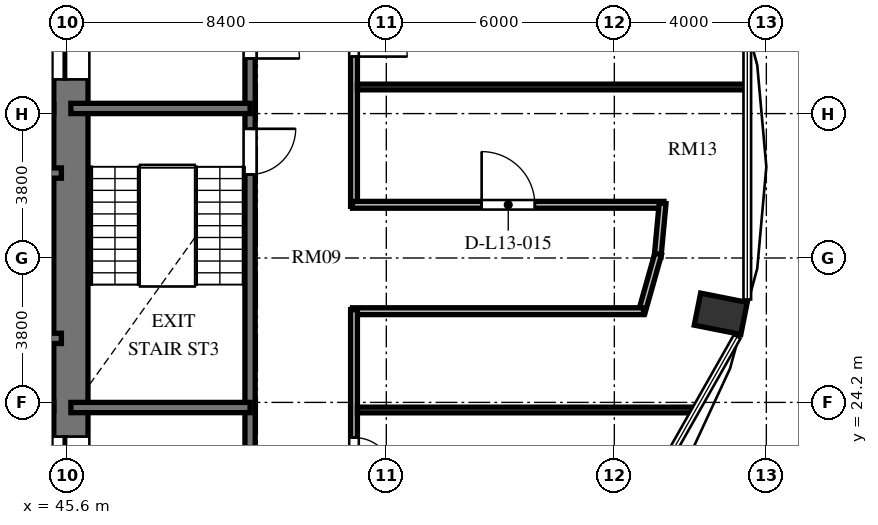
"""IFC4 building model, lengths in metres.
Left out: names, types, materials, properties, quantities, classifications, styles, units other than length and angle.
Written with IfcOpenShell. Run it as: python <this file> out.ifc"""

import sys

from ifc_helpers import new_model, si_unit, direction, frame, frame_2d, origin, origin_2d, place, context, subcontext, project, spatial, rectangle, extrude, element, fill, save


model = new_model("IFC4")
c1 = context("Model", 3, precision=1e-05, world=origin(), true_north=direction((0.0, 1.0)))
c2 = subcontext(c1, "Body", "Model", "MODEL_VIEW")
j1 = project(units=[si_unit("LENGTHUNIT", "METRE"), si_unit("PLANEANGLEUNIT", "RADIAN")], contexts=[c1])
p1 = place(None, origin())
s1 = spatial("IfcSite", under=j1, at=p1, CompositionType="ELEMENT")
p2 = place(p1, origin())
s2 = spatial("IfcBuilding", under=s1, at=p2, CompositionType="ELEMENT")
p3 = place(p2, frame((0.0, 0.0, 54.384)))
s3 = spatial("IfcBuildingStorey", under=s2, at=p3, CompositionType="ELEMENT", Elevation=54.384)
p4 = place(p3, frame((62.8, 26.532, 0.0), z_axis=(0.0, 0.0, 1.0), x_axis=(0.980785280403, -0.195090322016, 0.0)))
e1 = element("IfcColumn", 1, at=p4, inside=s3, PredefinedType="COLUMN", context=c2, shape_type="SweptSolid", body=[
    extrude(rectangle(XDim=1.25, YDim=0.86, at=origin_2d()), origin(), (0.0, 0.0, 1.0), 3.648),
])
p5 = place(p3, frame((45.7, 20.95, 0.0), z_axis=(0.0, 0.0, 1.0), x_axis=(0.0, 1.0, 0.0)))
e2 = element("IfcWall", 2, at=p5, inside=s3, PredefinedType="SHEAR", context=c2, shape_type="SweptSolid", body=[
    extrude(rectangle(XDim=14.1, YDim=0.9, at=frame_2d((7.05, 0.0))), origin(), (0.0, 0.0, 1.0), 3.648),
])
p6 = place(p5, frame((11.75, 0.0, 0.0)))
e3 = element("IfcOpeningElement", 3, at=p6, cuts=e2, PredefinedType="OPENING", context=c2, shape_type="SweptSolid", body=[
    extrude(rectangle(XDim=1.4, YDim=2.3, at=frame_2d((0.7, 1.15))), frame((0.0, 0.46, 0.0), z_axis=(0.0, -1.0, 0.0), x_axis=(1.0, 0.0, 0.0)), (0.0, 0.0, 1.0), 0.92),
])
p7 = place(p5, frame((0.95, 0.0, 0.0)))
e4 = element("IfcOpeningElement", 4, at=p7, cuts=e2, PredefinedType="OPENING", context=c2, shape_type="SweptSolid", body=[
    extrude(rectangle(XDim=1.4, YDim=2.3, at=frame_2d((0.7, 1.15))), frame((0.0, 0.46, 0.0), z_axis=(0.0, -1.0, 0.0), x_axis=(1.0, 0.0, 0.0)), (0.0, 0.0, 1.0), 0.92),
])
p8 = place(p3, frame((37.465, 30.235, 0.0), z_axis=(0.0, 0.0, 1.0), x_axis=(1.0, 0.0, 0.0)))
e5 = element("IfcWall", 5, at=p8, inside=s3, PredefinedType="SHEAR", context=c2, shape_type="SweptSolid", body=[
    extrude(rectangle(XDim=7.985, YDim=0.27, at=frame_2d((3.992, 0.0))), origin(), (0.0, 0.0, 1.0), 3.648),
])
p9 = place(p8, frame((6.455, 0.0, 0.0)))
e6 = element("IfcOpeningElement", 6, at=p9, cuts=e5, PredefinedType="OPENING", context=c2, shape_type="SweptSolid", body=[
    extrude(rectangle(XDim=1.2, YDim=2.15, at=frame_2d((0.6, 1.075))), frame((0.0, 0.145, 0.0), z_axis=(0.0, -1.0, 0.0), x_axis=(1.0, 0.0, 0.0)), (0.0, 0.0, 1.0), 0.29),
])
p10 = place(p3, frame((37.465, 25.885, 0.0), z_axis=(0.0, 0.0, 1.0), x_axis=(1.0, 0.0, 0.0)))
e7 = element("IfcWall", 7, at=p10, inside=s3, PredefinedType="SHEAR", context=c2, shape_type="SweptSolid", body=[
    extrude(rectangle(XDim=7.985, YDim=0.27, at=frame_2d((3.992, 0.0))), origin(), (0.0, 0.0, 1.0), 3.648),
])
for number, where, z_axis, x_axis in (
    (8, (42.95, 31.92, 0.0), (0.0, 0.0, 1.0), (1.0, 0.0, 0.0)),
    (9, (42.95, 24.1, 0.0), (0.0, 0.0, 1.0), (1.0, 0.0, 0.0)),
):
    element("IfcWall", number, at=place(p3, frame(where, z_axis=z_axis, x_axis=x_axis)), inside=s3, PredefinedType="SOLIDWALL", context=c2, shape_type="SweptSolid", body=[
        extrude(rectangle(XDim=2.3, YDim=0.25, at=frame_2d((1.15, 0.0))), origin(), (0.0, 0.0, 1.0), 3.428),
    ])
p11 = place(p3, frame((50.415, 35.845, 0.0), z_axis=(0.0, 0.0, 1.0), x_axis=(0.0, -1.0, 0.0)))
e10 = element("IfcWall", 10, at=p11, inside=s3, PredefinedType="SHEAR", context=c2, shape_type="SweptSolid", body=[
    extrude(rectangle(XDim=15.825, YDim=0.27, at=frame_2d((7.913, 0.0))), origin(), (0.0, 0.0, 1.0), 3.648),
])
p12 = place(p11, frame((4.445, 0.0, 0.0)))
e11 = element("IfcOpeningElement", 11, at=p12, cuts=e10, PredefinedType="OPENING", context=c2, shape_type="SweptSolid", body=[
    extrude(rectangle(XDim=1.2, YDim=2.15, at=frame_2d((0.6, 1.075))), frame((0.0, 0.145, 0.0), z_axis=(0.0, -1.0, 0.0), x_axis=(1.0, 0.0, 0.0)), (0.0, 0.0, 1.0), 0.29),
])
p13 = place(p11, frame((1.295, 0.0, 0.0)))
e12 = element("IfcOpeningElement", 12, at=p13, cuts=e10, PredefinedType="OPENING", context=c2, shape_type="SweptSolid", body=[
    extrude(rectangle(XDim=1.3, YDim=2.2, at=frame_2d((0.65, 1.1))), frame((0.0, 0.145, 0.0), z_axis=(0.0, -1.0, 0.0), x_axis=(1.0, 0.0, 0.0)), (0.0, 0.0, 1.0), 0.29),
])
p14 = place(p11, frame((13.095, 0.0, 0.0)))
e13 = element("IfcOpeningElement", 13, at=p14, cuts=e10, PredefinedType="OPENING", context=c2, shape_type="SweptSolid", body=[
    extrude(rectangle(XDim=1.3, YDim=2.2, at=frame_2d((0.65, 1.1))), frame((0.0, 0.145, 0.0), z_axis=(0.0, -1.0, 0.0), x_axis=(1.0, 0.0, 0.0)), (0.0, 0.0, 1.0), 0.29),
])
for number, where, z_axis, x_axis in (
    (14, (45.7, 31.935, 0.0), (0.0, 0.0, 1.0), (1.0, 0.0, 0.0)),
    (15, (45.7, 24.065, 0.0), (0.0, 0.0, 1.0), (1.0, 0.0, 0.0)),
):
    element("IfcWall", number, at=place(p3, frame(where, z_axis=z_axis, x_axis=x_axis)), inside=s3, PredefinedType="SHEAR", context=c2, shape_type="SweptSolid", body=[
        extrude(rectangle(XDim=4.715, YDim=0.27, at=frame_2d((2.357, 0.0))), origin(), (0.0, 0.0, 1.0), 3.648),
    ])
p15 = place(p3, frame((53.15, 38.79, 0.0), z_axis=(0.0, 0.0, 1.0), x_axis=(0.0, -1.0, 0.0)))
e16 = element("IfcWall", 16, at=p15, inside=s3, PredefinedType="PARTITIONING", context=c2, shape_type="SweptSolid", body=[
    extrude(rectangle(XDim=9.43, YDim=0.18, at=frame_2d((4.715, 0.0))), origin(), (0.0, 0.0, 1.0), 3.428),
])
p16 = place(p15, frame((4.09, 0.0, 0.0)))
e17 = element("IfcOpeningElement", 17, at=p16, cuts=e16, PredefinedType="OPENING", context=c2, shape_type="SweptSolid", body=[
    extrude(rectangle(XDim=1.4, YDim=2.2, at=frame_2d((0.7, 1.1))), frame((0.0, 0.1, 0.0), z_axis=(0.0, -1.0, 0.0), x_axis=(1.0, 0.0, 0.0)), (0.0, 0.0, 1.0), 0.2),
])
p17 = place(p3, frame((53.11, 29.4, 0.0), z_axis=(0.0, 0.0, 1.0), x_axis=(1.0, 0.0, 0.0)))
e18 = element("IfcWall", 18, at=p17, inside=s3, PredefinedType="PARTITIONING", context=c2, shape_type="SweptSolid", body=[
    extrude(rectangle(XDim=8.197, YDim=0.18, at=frame_2d((4.098, 0.0))), origin(), (0.0, 0.0, 1.0), 3.428),
])
p18 = place(p17, frame((3.398, 0.0, 0.0)))
e19 = element("IfcOpeningElement", 19, at=p18, cuts=e18, PredefinedType="OPENING", context=c2, shape_type="SweptSolid", body=[
    extrude(rectangle(XDim=1.4, YDim=2.2, at=frame_2d((0.7, 1.1))), frame((0.0, 0.1, 0.0), z_axis=(0.0, -1.0, 0.0), x_axis=(1.0, 0.0, 0.0)), (0.0, 0.0, 1.0), 0.2),
])
p19 = place(p3, frame((61.271, 29.44, 0.0), z_axis=(0.0, 0.0, 1.0), x_axis=(-0.092539930621, -0.995708974169, 0.0)))
e20 = element("IfcWall", 20, at=p19, inside=s3, PredefinedType="PARTITIONING", context=c2, shape_type="SweptSolid", body=[
    extrude(rectangle(XDim=1.417, YDim=0.18, at=frame_2d((0.708, 0.0))), origin(), (0.0, 0.0, 1.0), 3.428),
])
p20 = place(p3, frame((61.154, 28.107, 0.0), z_axis=(0.0, 0.0, 1.0), x_axis=(-0.271748942561, -0.962368179138, 0.0)))
e21 = element("IfcWall", 21, at=p20, inside=s3, PredefinedType="PARTITIONING", context=c2, shape_type="SweptSolid", body=[
    extrude(rectangle(XDim=1.606, YDim=0.18, at=frame_2d((0.803, 0.0))), origin(), (0.0, 0.0, 1.0), 3.428),
])
p21 = place(p3, frame((60.768, 26.6, 0.0), z_axis=(0.0, 0.0, 1.0), x_axis=(-1.0, 0.0, 0.0)))
e22 = element("IfcWall", 22, at=p21, inside=s3, PredefinedType="PARTITIONING", context=c2, shape_type="SweptSolid", body=[
    extrude(rectangle(XDim=7.658, YDim=0.18, at=frame_2d((3.829, 0.0))), origin(), (0.0, 0.0, 1.0), 3.428),
])
p22 = place(p3, frame((53.15, 26.64, 0.0), z_axis=(0.0, 0.0, 1.0), x_axis=(0.0, -1.0, 0.0)))
e23 = element("IfcWall", 23, at=p22, inside=s3, PredefinedType="PARTITIONING", context=c2, shape_type="SweptSolid", body=[
    extrude(rectangle(XDim=6.66, YDim=0.18, at=frame_2d((3.33, 0.0))), origin(), (0.0, 0.0, 1.0), 3.428),
])
p23 = place(p22, frame((3.365, 0.0, 0.0)))
e24 = element("IfcOpeningElement", 24, at=p23, cuts=e23, PredefinedType="OPENING", context=c2, shape_type="SweptSolid", body=[
    extrude(rectangle(XDim=1.05, YDim=2.15, at=frame_2d((0.525, 1.075))), frame((0.0, 0.1, 0.0), z_axis=(0.0, -1.0, 0.0), x_axis=(1.0, 0.0, 0.0)), (0.0, 0.0, 1.0), 0.2),
])
p24 = place(p3, frame((53.24, 24.0, 0.0), z_axis=(0.0, 0.0, 1.0), x_axis=(1.0, 0.0, 0.0)))
e25 = element("IfcWall", 25, at=p24, inside=s3, PredefinedType="PARTITIONING", context=c2, shape_type="SweptSolid", body=[
    extrude(rectangle(XDim=8.895, YDim=0.15, at=frame_2d((4.448, 0.0))), origin(), (0.0, 0.0, 1.0), 3.428),
])
p25 = place(p3, frame((53.24, 32.5, 0.0), z_axis=(0.0, 0.0, 1.0), x_axis=(1.0, 0.0, 0.0)))
e26 = element("IfcWall", 26, at=p25, inside=s3, PredefinedType="PARTITIONING", context=c2, shape_type="SweptSolid", body=[
    extrude(rectangle(XDim=10.252, YDim=0.15, at=frame_2d((5.126, 0.0))), origin(), (0.0, 0.0, 1.0), 3.428),
])
p26 = place(p6, origin())
e27 = element("IfcDoor", 27, at=p26, inside=s3, OperationType="SLIDING_TO_LEFT", PredefinedType="DOOR", context=c2, shape_type="SweptSolid", body=[
    extrude(rectangle(XDim=1.4, YDim=2.3, at=frame_2d((0.7, 1.15))), frame((0.0, 0.025, 0.0), z_axis=(0.0, -1.0, 0.0), x_axis=(1.0, 0.0, 0.0)), (0.0, 0.0, 1.0), 0.05),
])
fill(e3, e27)
p27 = place(p7, origin())
e28 = element("IfcDoor", 28, at=p27, inside=s3, OperationType="SLIDING_TO_LEFT", PredefinedType="DOOR", context=c2, shape_type="SweptSolid", body=[
    extrude(rectangle(XDim=1.4, YDim=2.3, at=frame_2d((0.7, 1.15))), frame((0.0, 0.025, 0.0), z_axis=(0.0, -1.0, 0.0), x_axis=(1.0, 0.0, 0.0)), (0.0, 0.0, 1.0), 0.05),
])
fill(e4, e28)
p28 = place(p12, origin())
e29 = element("IfcDoor", 29, at=p28, inside=s3, OperationType="SINGLE_SWING_LEFT", PredefinedType="DOOR", context=c2, shape_type="SweptSolid", body=[
    extrude(rectangle(XDim=1.2, YDim=2.15, at=frame_2d((0.6, 1.075))), frame((0.0, 0.025, 0.0), z_axis=(0.0, -1.0, 0.0), x_axis=(1.0, 0.0, 0.0)), (0.0, 0.0, 1.0), 0.05),
])
fill(e11, e29)
p29 = place(p13, origin())
e30 = element("IfcDoor", 30, at=p29, inside=s3, OperationType="SINGLE_SWING_RIGHT", PredefinedType="DOOR", context=c2, shape_type="SweptSolid", body=[
    extrude(rectangle(XDim=1.3, YDim=2.2, at=frame_2d((0.65, 1.1))), frame((0.0, 0.025, 0.0), z_axis=(0.0, -1.0, 0.0), x_axis=(1.0, 0.0, 0.0)), (0.0, 0.0, 1.0), 0.05),
])
fill(e12, e30)
p30 = place(p23, origin())
e31 = element("IfcDoor", 31, at=p30, inside=s3, OperationType="SINGLE_SWING_RIGHT", PredefinedType="DOOR", context=c2, shape_type="SweptSolid", body=[
    extrude(rectangle(XDim=1.05, YDim=2.15, at=frame_2d((0.525, 1.075))), frame((0.0, 0.025, 0.0), z_axis=(0.0, -1.0, 0.0), x_axis=(1.0, 0.0, 0.0)), (0.0, 0.0, 1.0), 0.05),
])
fill(e24, e31)
p31 = place(p18, origin())
e32 = element("IfcDoor", 32, at=p31, inside=s3, OperationType="SINGLE_SWING_LEFT", PredefinedType="DOOR", context=c2, shape_type="SweptSolid", body=[
    extrude(rectangle(XDim=1.4, YDim=2.2, at=frame_2d((0.7, 1.1))), frame((0.0, 0.025, 0.0), z_axis=(0.0, -1.0, 0.0), x_axis=(1.0, 0.0, 0.0)), (0.0, 0.0, 1.0), 0.05),
])
fill(e19, e32)
p32 = place(p16, origin())
e33 = element("IfcDoor", 33, at=p32, inside=s3, OperationType="SINGLE_SWING_RIGHT", PredefinedType="DOOR", context=c2, shape_type="SweptSolid", body=[
    extrude(rectangle(XDim=1.4, YDim=2.2, at=frame_2d((0.7, 1.1))), frame((0.0, 0.025, 0.0), z_axis=(0.0, -1.0, 0.0), x_axis=(1.0, 0.0, 0.0)), (0.0, 0.0, 1.0), 0.05),
])
fill(e17, e33)
save(model, sys.argv[1])
